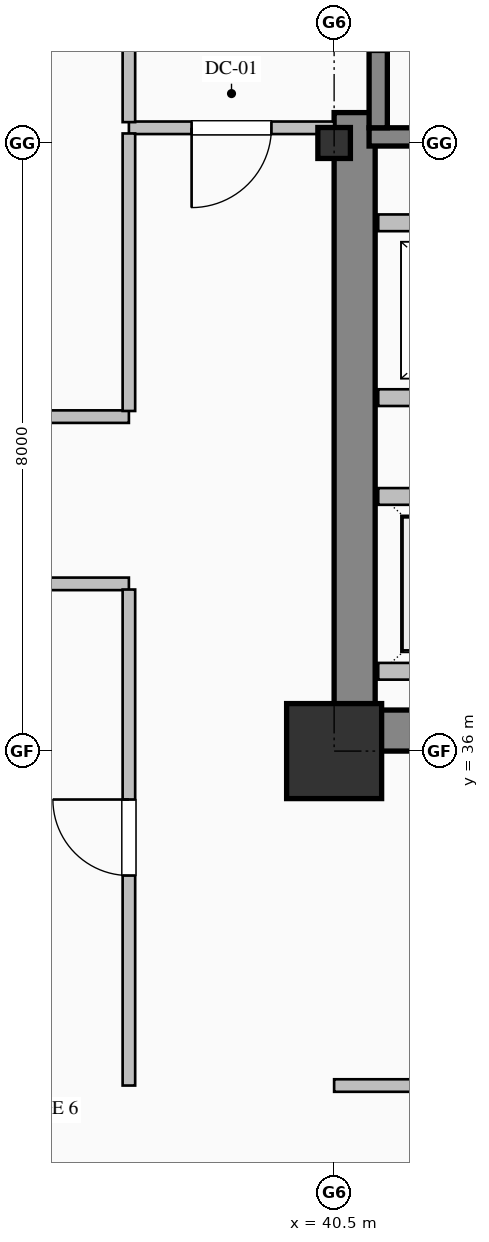
"""IFC4 building model, lengths in metres.
Left out: names, types, materials, properties, quantities, classifications, styles, units other than length and angle.
Written with IfcOpenShell. Run it as: python <this file> out.ifc"""

import sys

from ifc_helpers import new_model, si_unit, direction, frame, frame_2d, origin, origin_2d, place, context, subcontext, project, spatial, rectangle, hollow_rectangle, i_section, extrude, element, fill, save


model = new_model("IFC4")
c1 = context("Model", 3, precision=1e-05, world=origin(), true_north=direction((0.0, 1.0)))
c2 = subcontext(c1, "Body", "Model", "MODEL_VIEW")
j1 = project(units=[si_unit("LENGTHUNIT", "METRE"), si_unit("PLANEANGLEUNIT", "RADIAN")], contexts=[c1])
p1 = place(None, origin())
s1 = spatial("IfcSite", under=j1, at=p1, CompositionType="ELEMENT")
p2 = place(p1, origin())
s2 = spatial("IfcBuilding", under=s1, at=p2, CompositionType="ELEMENT")
p3 = place(p2, frame((0.0, 0.0, 92.2)))
s3 = spatial("IfcBuildingStorey", under=s2, at=p3, CompositionType="ELEMENT", Elevation=92.2)
p4 = place(p3, frame((40.77, 36.54, 0.0), z_axis=(0.0, 0.0, 1.0), x_axis=(0.0, 1.0, 0.0)))
e1 = element("IfcWall", 1, at=p4, inside=s3, PredefinedType="SHEAR", context=c2, shape_type="SweptSolid", body=[
    extrude(rectangle(XDim=7.86, YDim=0.54, at=frame_2d((3.93, 0.0))), origin(), (0.0, 0.0, 1.0), 3.75),
])
p5 = place(p3, frame((40.5, 36.27, 0.0), z_axis=(0.0, 0.0, 1.0), x_axis=(1.0, 0.0, 0.0)))
e2 = element("IfcWall", 2, at=p5, inside=s3, PredefinedType="SHEAR", context=c2, shape_type="SweptSolid", body=[
    extrude(rectangle(XDim=1.7, YDim=0.54, at=frame_2d((0.85, 0.0))), origin(), (0.0, 0.0, 1.0), 3.75),
])
p6 = place(p3, frame((40.5, 36.0, 0.0), z_axis=(0.0, 0.0, 1.0), x_axis=(1.0, 0.0, 0.0)))
e3 = element("IfcColumn", 3, at=p6, inside=s3, PredefinedType="COLUMN", context=c2, shape_type="SweptSolid", body=[
    extrude(hollow_rectangle(XDim=1.25, YDim=1.25, WallThickness=0.045, at=origin_2d()), origin(), (0.0, 0.0, 1.0), 4.0),
])
p7 = place(p3, frame((40.5, 44.0, 0.0), z_axis=(0.0, 0.0, 1.0), x_axis=(1.0, 0.0, 0.0)))
e4 = element("IfcColumn", 4, at=p7, inside=s3, PredefinedType="COLUMN", context=c2, shape_type="SweptSolid", body=[
    extrude(i_section(OverallWidth=0.407, OverallDepth=0.428, WebThickness=0.02, FlangeThickness=0.035, FilletRadius=0.022, at=origin_2d()), origin(), (0.0, 0.0, 1.0), 4.0),
])
p8 = place(p3, frame((49.04, 44.08, 0.0), z_axis=(0.0, 0.0, 1.0), x_axis=(-1.0, 0.0, 0.0)))
e5 = element("IfcWall", 5, at=p8, inside=s3, PredefinedType="SOLIDWALL", context=c2, shape_type="SweptSolid", body=[
    extrude(rectangle(XDim=8.08, YDim=0.24, at=frame_2d((4.04, 0.0))), origin(), (0.0, 0.0, 1.0), 4.0),
])
p9 = place(p3, frame((41.08, 47.35, 0.0), z_axis=(0.0, 0.0, 1.0), x_axis=(0.0, -1.0, 0.0)))
e6 = element("IfcWall", 6, at=p9, inside=s3, PredefinedType="SOLIDWALL", context=c2, shape_type="SweptSolid", body=[
    extrude(rectangle(XDim=3.15, YDim=0.24, at=frame_2d((1.575, 0.0))), origin(), (0.0, 0.0, 1.0), 4.0),
])
p10 = place(p9, frame((1.0, 0.0, 0.0)))
e7 = element("IfcOpeningElement", 7, at=p10, cuts=e6, PredefinedType="OPENING", context=c2, shape_type="SweptSolid", body=[
    extrude(rectangle(XDim=1.15, YDim=2.2, at=frame_2d((0.575, 1.1))), frame((0.0, 0.13, 0.0), z_axis=(0.0, -1.0, 0.0), x_axis=(1.0, 0.0, 0.0)), (0.0, 0.0, 1.0), 0.26),
])
p11 = place(p3, frame((49.32, 37.05, 0.0), z_axis=(0.0, 0.0, 1.0), x_axis=(-1.0, 0.0, 0.0)))
e8 = element("IfcWall", 8, at=p11, inside=s3, PredefinedType="PARTITIONING", context=c2, shape_type="SweptSolid", body=[
    extrude(rectangle(XDim=8.24, YDim=0.22, at=frame_2d((4.12, 0.0))), origin(), (0.0, 0.0, 1.0), 3.75),
])
p12 = place(p11, frame((6.37, 0.0, 0.0)))
e9 = element("IfcOpeningElement", 9, at=p12, cuts=e8, PredefinedType="OPENING", context=c2, shape_type="SweptSolid", body=[
    extrude(rectangle(XDim=1.1, YDim=2.2, at=frame_2d((0.55, 1.1))), frame((0.0, 0.12, 0.0), z_axis=(0.0, -1.0, 0.0), x_axis=(1.0, 0.0, 0.0)), (0.0, 0.0, 1.0), 0.24),
])
p13 = place(p11, frame((3.57, 0.0, 0.0)))
e10 = element("IfcOpeningElement", 10, at=p13, cuts=e8, PredefinedType="OPENING", context=c2, shape_type="SweptSolid", body=[
    extrude(rectangle(XDim=1.1, YDim=2.2, at=frame_2d((0.55, 1.1))), frame((0.0, 0.12, 0.0), z_axis=(0.0, -1.0, 0.0), x_axis=(1.0, 0.0, 0.0)), (0.0, 0.0, 1.0), 0.24),
])
p14 = place(p11, frame((0.77, 0.0, 0.0)))
e11 = element("IfcOpeningElement", 11, at=p14, cuts=e8, PredefinedType="OPENING", context=c2, shape_type="SweptSolid", body=[
    extrude(rectangle(XDim=1.1, YDim=2.2, at=frame_2d((0.55, 1.1))), frame((0.0, 0.12, 0.0), z_axis=(0.0, -1.0, 0.0), x_axis=(1.0, 0.0, 0.0)), (0.0, 0.0, 1.0), 0.24),
])
for number, where, z_axis, x_axis in (
    (12, (41.08, 39.35, 0.0), (0.0, 0.0, 1.0), (1.0, 0.0, 0.0)),
    (13, (49.32, 40.65, 0.0), (0.0, 0.0, 1.0), (-1.0, 0.0, 0.0)),
    (14, (41.08, 42.95, 0.0), (0.0, 0.0, 1.0), (1.0, 0.0, 0.0)),
):
    element("IfcWall", number, at=place(p3, frame(where, z_axis=z_axis, x_axis=x_axis)), inside=s3, PredefinedType="PARTITIONING", context=c2, shape_type="SweptSolid", body=[
        extrude(rectangle(XDim=8.24, YDim=0.22, at=frame_2d((4.12, 0.0))), origin(), (0.0, 0.0, 1.0), 3.75),
    ])
p15 = place(p3, frame((40.5, 44.2, 0.0), z_axis=(0.0, 0.0, 1.0), x_axis=(-1.0, 0.0, 0.0)))
e15 = element("IfcWall", 15, at=p15, inside=s3, PredefinedType="PARTITIONING", context=c2, shape_type="SweptSolid", body=[
    extrude(rectangle(XDim=2.7, YDim=0.165, at=frame_2d((1.35, 0.0))), origin(), (0.0, 0.0, 1.0), 3.75),
])
p16 = place(p15, frame((0.825, 0.0, 0.0)))
e16 = element("IfcOpeningElement", 16, at=p16, cuts=e15, PredefinedType="OPENING", context=c2, shape_type="SweptSolid", body=[
    extrude(rectangle(XDim=1.05, YDim=2.15, at=frame_2d((0.525, 1.075))), frame((0.0, 0.093, 0.0), z_axis=(0.0, -1.0, 0.0), x_axis=(1.0, 0.0, 0.0)), (0.0, 0.0, 1.0), 0.185),
])
p17 = place(p3, frame((37.8, 44.274, 0.0), z_axis=(0.0, 0.0, 1.0), x_axis=(0.0, 1.0, 0.0)))
e17 = element("IfcWall", 17, at=p17, inside=s3, PredefinedType="PARTITIONING", context=c2, shape_type="SweptSolid", body=[
    extrude(rectangle(XDim=3.051, YDim=0.165, at=frame_2d((1.525, 0.0))), origin(), (0.0, 0.0, 1.0), 3.75),
])
p18 = place(p3, frame((31.0, 40.4, 0.0), z_axis=(0.0, 0.0, 1.0), x_axis=(1.0, 0.0, 0.0)))
e18 = element("IfcWall", 18, at=p18, inside=s3, PredefinedType="PARTITIONING", context=c2, shape_type="SweptSolid", body=[
    extrude(rectangle(XDim=6.8, YDim=0.165, at=frame_2d((3.4, 0.0))), origin(), (0.0, 0.0, 1.0), 3.75),
])
p19 = place(p18, frame((2.9, 0.0, 0.0)))
e19 = element("IfcOpeningElement", 19, at=p19, cuts=e18, PredefinedType="OPENING", context=c2, shape_type="SweptSolid", body=[
    extrude(rectangle(XDim=1.0, YDim=2.15, at=frame_2d((0.5, 1.075))), frame((0.0, 0.093, 0.0), z_axis=(0.0, -1.0, 0.0), x_axis=(1.0, 0.0, 0.0)), (0.0, 0.0, 1.0), 0.185),
])
p20 = place(p3, frame((37.8, 38.2, 0.0), z_axis=(0.0, 0.0, 1.0), x_axis=(-1.0, 0.0, 0.0)))
e20 = element("IfcWall", 20, at=p20, inside=s3, PredefinedType="PARTITIONING", context=c2, shape_type="SweptSolid", body=[
    extrude(rectangle(XDim=4.0, YDim=0.165, at=frame_2d((2.0, 0.0))), origin(), (0.0, 0.0, 1.0), 3.75),
])
p21 = place(p3, frame((37.8, 40.475, 0.0), z_axis=(0.0, 0.0, 1.0), x_axis=(0.0, 1.0, 0.0)))
e21 = element("IfcWall", 21, at=p21, inside=s3, PredefinedType="PARTITIONING", context=c2, shape_type="SweptSolid", body=[
    extrude(rectangle(XDim=3.651, YDim=0.165, at=frame_2d((1.825, 0.0))), origin(), (0.0, 0.0, 1.0), 3.75),
])
p22 = place(p3, frame((37.8, 31.6, 0.0), z_axis=(0.0, 0.0, 1.0), x_axis=(0.0, 1.0, 0.0)))
e22 = element("IfcWall", 22, at=p22, inside=s3, PredefinedType="PARTITIONING", context=c2, shape_type="SweptSolid", body=[
    extrude(rectangle(XDim=6.525, YDim=0.165, at=frame_2d((3.263, 0.0))), origin(), (0.0, 0.0, 1.0), 3.75),
])
p23 = place(p22, frame((2.763, 0.0, 0.0)))
e23 = element("IfcOpeningElement", 23, at=p23, cuts=e22, PredefinedType="OPENING", context=c2, shape_type="SweptSolid", body=[
    extrude(rectangle(XDim=1.0, YDim=2.15, at=frame_2d((0.5, 1.075))), frame((0.0, 0.093, 0.0), z_axis=(0.0, -1.0, 0.0), x_axis=(1.0, 0.0, 0.0)), (0.0, 0.0, 1.0), 0.185),
])
p24 = place(p3, frame((43.0, 31.6, 0.0), z_axis=(0.0, 0.0, 1.0), x_axis=(-1.0, 0.0, 0.0)))
e24 = element("IfcWall", 24, at=p24, inside=s3, PredefinedType="PARTITIONING", context=c2, shape_type="SweptSolid", body=[
    extrude(rectangle(XDim=2.5, YDim=0.165, at=frame_2d((1.25, 0.0))), origin(), (0.0, 0.0, 1.0), 3.75),
])
p25 = place(p16, origin())
e25 = element("IfcDoor", 25, at=p25, inside=s3, OperationType="SINGLE_SWING_RIGHT", PredefinedType="DOOR", context=c2, shape_type="SweptSolid", body=[
    extrude(rectangle(XDim=1.05, YDim=2.15, at=frame_2d((0.525, 1.075))), frame((0.0, 0.025, 0.0), z_axis=(0.0, -1.0, 0.0), x_axis=(1.0, 0.0, 0.0)), (0.0, 0.0, 1.0), 0.05),
])
fill(e16, e25)
p26 = place(p23, origin())
e26 = element("IfcDoor", 26, at=p26, inside=s3, OperationType="SINGLE_SWING_RIGHT", PredefinedType="DOOR", context=c2, shape_type="SweptSolid", body=[
    extrude(rectangle(XDim=1.0, YDim=2.15, at=frame_2d((0.5, 1.075))), frame((0.0, 0.025, 0.0), z_axis=(0.0, -1.0, 0.0), x_axis=(1.0, 0.0, 0.0)), (0.0, 0.0, 1.0), 0.05),
])
fill(e23, e26)
save(model, sys.argv[1])
